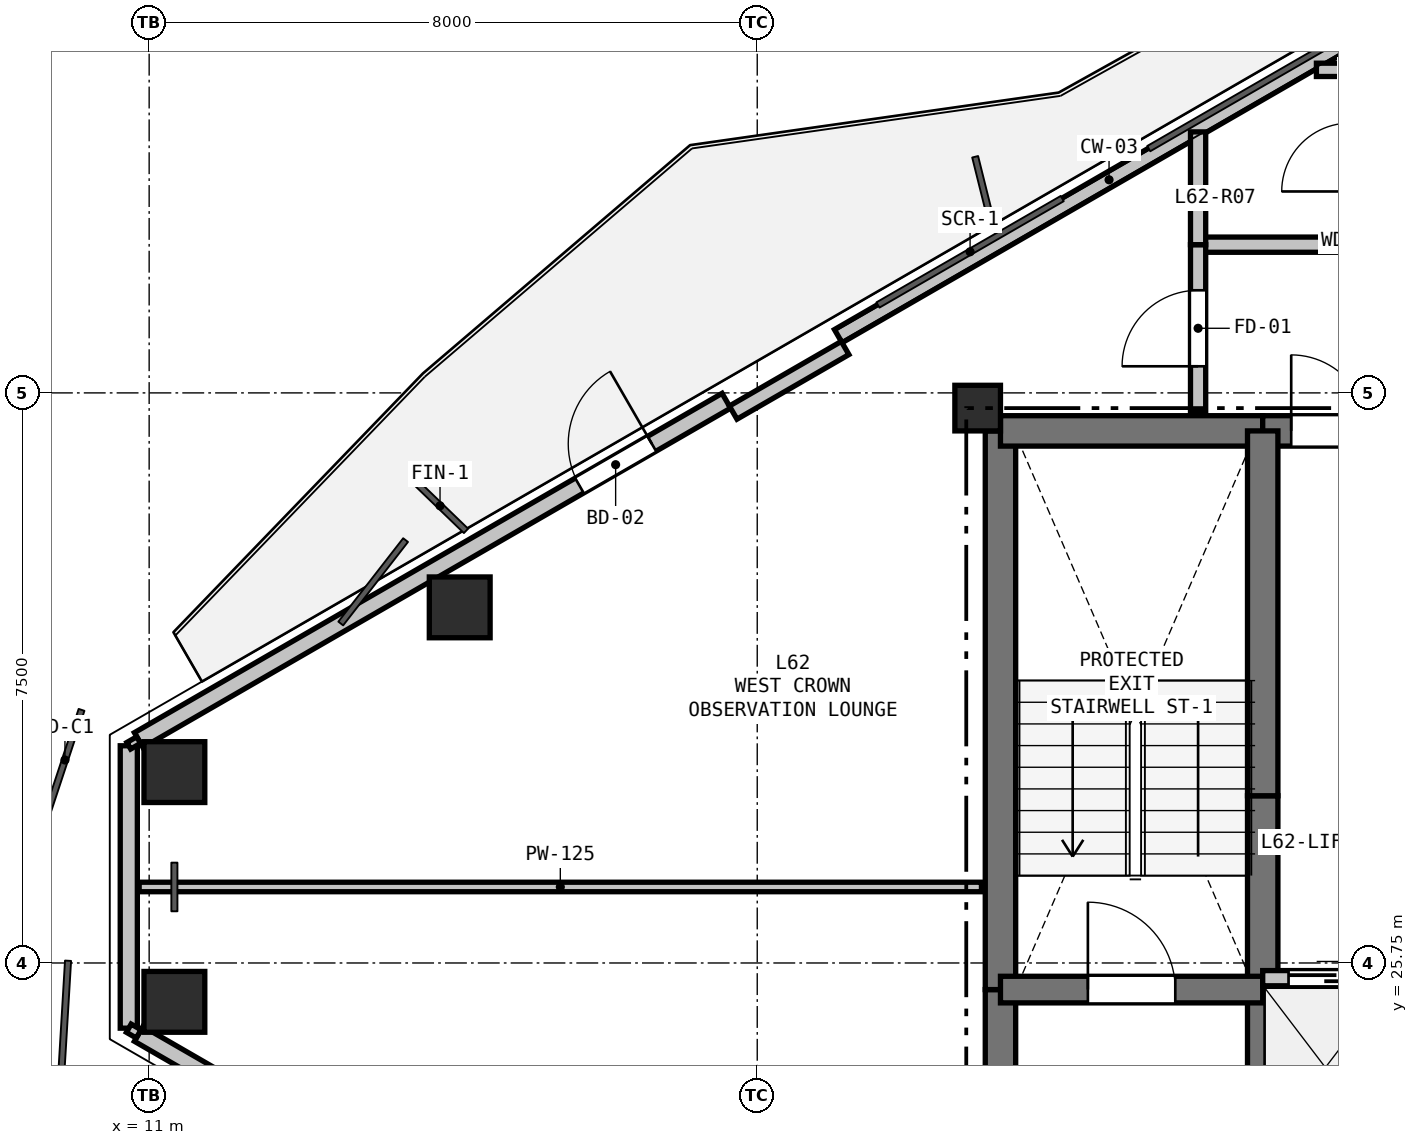
"""IFC4 building model, lengths in metres.
Left out: names, types, materials, properties, quantities, classifications, styles, units other than length and angle.
Written with IfcOpenShell. Run it as: python <this file> out.ifc"""

import sys

from ifc_helpers import new_model, si_unit, direction, frame, frame_2d, origin, origin_2d, place, context, subcontext, project, spatial, rectangle, hollow_rectangle, extrude, element, fill, save


model = new_model("IFC4")
c1 = context("Model", 3, precision=1e-05, world=origin(), true_north=direction((0.0, 1.0)))
c2 = subcontext(c1, "Body", "Model", "MODEL_VIEW")
j1 = project(units=[si_unit("LENGTHUNIT", "METRE"), si_unit("PLANEANGLEUNIT", "RADIAN")], contexts=[c1])
p1 = place(None, origin())
s1 = spatial("IfcSite", under=j1, at=p1, CompositionType="ELEMENT")
p2 = place(p1, origin())
s2 = spatial("IfcBuilding", under=s1, at=p2, CompositionType="ELEMENT")
p3 = place(p2, frame((0.0, 0.0, 223.2)))
s3 = spatial("IfcBuildingStorey", under=s2, at=p3, CompositionType="ELEMENT", Elevation=223.2)
p4 = place(p3, frame((21.9, 33.05, 0.0), z_axis=(0.0, 0.0, 1.0), x_axis=(1.0, 0.0, 0.0)))
e1 = element("IfcColumn", 1, at=p4, inside=s3, PredefinedType="COLUMN", context=c2, shape_type="SweptSolid", body=[
    extrude(rectangle(XDim=0.6, YDim=0.6, at=origin_2d()), origin(), (0.0, 0.0, 1.0), 3.3),
])
for number, where, z_axis, x_axis in (
    (2, (11.332, 28.261, -0.22), (0.0, 0.0, 1.0), (1.0, 0.0, 0.0)),
    (3, (15.086, 30.428, -0.22), (0.0, 0.0, 1.0), (1.0, 0.0, 0.0)),
    (4, (11.332, 25.239, -0.22), (0.0, 0.0, 1.0), (1.0, 0.0, 0.0)),
):
    element("IfcColumn", number, at=place(p3, frame(where, z_axis=z_axis, x_axis=x_axis)), inside=s3, PredefinedType="COLUMN", context=c2, shape_type="SweptSolid", body=[
        extrude(hollow_rectangle(XDim=0.8, YDim=0.8, WallThickness=0.025, at=origin_2d()), origin(), (0.0, 0.0, 1.0), 3.52),
    ])
p5 = place(p3, frame((10.732, 24.892, 0.0), z_axis=(0.0, 0.0, 1.0), x_axis=(0.0, 1.0, 0.0)))
e5 = element("IfcWall", 5, at=p5, inside=s3, PredefinedType="SOLIDWALL", context=c2, shape_type="SweptSolid", body=[
    extrude(rectangle(XDim=3.715, YDim=0.225, at=frame_2d((1.858, 0.0))), origin(), (0.0, 0.0, 1.0), 2.7),
])
p6 = place(p3, frame((10.862, 28.683, 0.0), z_axis=(0.0, 0.0, 1.0), x_axis=(0.866026655105, 0.499997832642, 0.0)))
e6 = element("IfcWall", 6, at=p6, inside=s3, PredefinedType="SOLIDWALL", context=c2, shape_type="SweptSolid", body=[
    extrude(rectangle(XDim=8.928, YDim=0.225, at=frame_2d((4.464, 0.0))), origin(), (0.0, 0.0, 1.0), 2.7),
])
p7 = place(p6, frame((6.696, 0.0, 0.0)))
e7 = element("IfcOpeningElement", 7, at=p7, cuts=e6, PredefinedType="OPENING", context=c2, shape_type="SweptSolid", body=[
    extrude(rectangle(XDim=1.1, YDim=2.1, at=frame_2d((0.55, 1.05))), frame((0.0, 0.123, 0.0), z_axis=(0.0, -1.0, 0.0), x_axis=(1.0, 0.0, 0.0)), (0.0, 0.0, 1.0), 0.245),
])
p8 = place(p3, frame((20.066, 33.997, 0.0), z_axis=(0.0, 0.0, 1.0), x_axis=(0.866019557082, 0.500010126649, 0.0)))
e8 = element("IfcWall", 8, at=p8, inside=s3, PredefinedType="PARAPET", context=c2, shape_type="SweptSolid", body=[
    extrude(rectangle(XDim=8.228, YDim=0.2, at=frame_2d((4.114, 0.0))), origin(), (0.0, 0.0, 1.0), 0.2),
])
p9 = place(p3, frame((18.684, 32.991, 0.0), z_axis=(0.0, 0.0, 1.0), x_axis=(0.866025371046, 0.500000056704, 0.0)))
e9 = element("IfcWall", 9, at=p9, inside=s3, PredefinedType="PARAPET", context=c2, shape_type="SweptSolid", body=[
    extrude(rectangle(XDim=1.7, YDim=0.2, at=frame_2d((0.85, 0.0))), origin(), (0.0, 0.0, 1.0), 2.7),
])
p10 = place(p3, frame((18.594, 20.354, 0.0), z_axis=(0.0, 0.0, 1.0), x_axis=(-0.866026655105, 0.499997832642, 0.0)))
e10 = element("IfcWall", 10, at=p10, inside=s3, PredefinedType="SOLIDWALL", context=c2, shape_type="SweptSolid", body=[
    extrude(rectangle(XDim=8.928, YDim=0.225, at=frame_2d((4.464, 0.0))), origin(), (0.0, 0.0, 1.0), 2.7),
])
p11 = place(p3, frame((22.2, 20.75, 0.0), z_axis=(0.0, 0.0, 1.0), x_axis=(0.0, 1.0, 0.0)))
e11 = element("IfcWall", 11, at=p11, inside=s3, PredefinedType="SHEAR", context=c2, shape_type="SweptSolid", body=[
    extrude(rectangle(XDim=4.65, YDim=0.4, at=frame_2d((2.325, 0.0))), origin(), (0.0, 0.0, 1.0), 3.08),
])
p12 = place(p3, frame((22.2, 25.4, 0.0), z_axis=(0.0, 0.0, 1.0), x_axis=(0.0, 1.0, 0.0)))
e12 = element("IfcWall", 12, at=p12, inside=s3, PredefinedType="SHEAR", context=c2, shape_type="SweptSolid", body=[
    extrude(rectangle(XDim=7.35, YDim=0.4, at=frame_2d((3.675, 0.0))), origin(), (0.0, 0.0, 1.0), 3.08),
])
p13 = place(p3, frame((22.2, 32.75, 0.0), z_axis=(0.0, 0.0, 1.0), x_axis=(1.0, 0.0, 0.0)))
e13 = element("IfcWall", 13, at=p13, inside=s3, PredefinedType="SHEAR", context=c2, shape_type="SweptSolid", body=[
    extrude(rectangle(XDim=3.45, YDim=0.4, at=frame_2d((1.725, 0.0))), origin(), (0.0, 0.0, 1.0), 3.08),
])
p14 = place(p3, frame((25.65, 32.75, 0.0), z_axis=(0.0, 0.0, 1.0), x_axis=(1.0, 0.0, 0.0)))
e14 = element("IfcWall", 14, at=p14, inside=s3, PredefinedType="SHEAR", context=c2, shape_type="SweptSolid", body=[
    extrude(rectangle(XDim=1.75, YDim=0.4, at=frame_2d((0.875, 0.0))), origin(), (0.0, 0.0, 1.0), 3.08),
])
p15 = place(p14, frame((0.375, 0.0, 0.0)))
e15 = element("IfcOpeningElement", 15, at=p15, cuts=e14, PredefinedType="OPENING", context=c2, shape_type="SweptSolid", body=[
    extrude(rectangle(XDim=1.0, YDim=2.15, at=frame_2d((0.5, 1.075))), frame((0.0, 0.21, 0.0), z_axis=(0.0, -1.0, 0.0), x_axis=(1.0, 0.0, 0.0)), (0.0, 0.0, 1.0), 0.42),
])
p16 = place(p3, frame((25.65, 22.75, 0.0), z_axis=(0.0, 0.0, 1.0), x_axis=(0.0, 1.0, 0.0)))
e16 = element("IfcWall", 16, at=p16, inside=s3, PredefinedType="SHEAR", context=c2, shape_type="SweptSolid", body=[
    extrude(rectangle(XDim=2.8, YDim=0.4, at=frame_2d((1.4, 0.0))), origin(), (0.0, 0.0, 1.0), 3.08),
])
p17 = place(p3, frame((25.65, 25.55, 0.0), z_axis=(0.0, 0.0, 1.0), x_axis=(0.0, 1.0, 0.0)))
e17 = element("IfcWall", 17, at=p17, inside=s3, PredefinedType="SHEAR", context=c2, shape_type="SweptSolid", body=[
    extrude(rectangle(XDim=2.4, YDim=0.4, at=frame_2d((1.2, 0.0))), origin(), (0.0, 0.0, 1.0), 3.08),
])
p18 = place(p3, frame((25.65, 27.95, 0.0), z_axis=(0.0, 0.0, 1.0), x_axis=(0.0, 1.0, 0.0)))
e18 = element("IfcWall", 18, at=p18, inside=s3, PredefinedType="SHEAR", context=c2, shape_type="SweptSolid", body=[
    extrude(rectangle(XDim=4.8, YDim=0.4, at=frame_2d((2.4, 0.0))), origin(), (0.0, 0.0, 1.0), 3.08),
])
p19 = place(p3, frame((22.2, 25.4, 0.0), z_axis=(0.0, 0.0, 1.0), x_axis=(1.0, 0.0, 0.0)))
e19 = element("IfcWall", 19, at=p19, inside=s3, PredefinedType="SHEAR", context=c2, shape_type="SweptSolid", body=[
    extrude(rectangle(XDim=3.45, YDim=0.35, at=frame_2d((1.725, 0.0))), origin(), (0.0, 0.0, 1.0), 3.08),
])
p20 = place(p19, frame((1.15, 0.0, 0.0)))
e20 = element("IfcOpeningElement", 20, at=p20, cuts=e19, PredefinedType="OPENING", context=c2, shape_type="SweptSolid", body=[
    extrude(rectangle(XDim=1.15, YDim=2.15, at=frame_2d((0.575, 1.075))), frame((0.0, 0.185, 0.0), z_axis=(0.0, -1.0, 0.0), x_axis=(1.0, 0.0, 0.0)), (0.0, 0.0, 1.0), 0.37),
])
p21 = place(p3, frame((25.65, 25.55, 0.0), z_axis=(0.0, 0.0, 1.0), x_axis=(1.0, 0.0, 0.0)))
e21 = element("IfcWall", 21, at=p21, inside=s3, PredefinedType="PARTITIONING", context=c2, shape_type="SweptSolid", body=[
    extrude(rectangle(XDim=4.95, YDim=0.2, at=frame_2d((2.475, 0.0))), origin(), (0.0, 0.0, 1.0), 3.08),
])
p22 = place(p21, frame((0.34, 0.0, 0.0)))
e22 = element("IfcOpeningElement", 22, at=p22, cuts=e21, PredefinedType="OPENING", context=c2, shape_type="SweptSolid", body=[
    extrude(rectangle(XDim=1.1, YDim=2.15, at=frame_2d((0.55, 1.075))), frame((0.0, 0.11, 0.0), z_axis=(0.0, -1.0, 0.0), x_axis=(1.0, 0.0, 0.0)), (0.0, 0.0, 1.0), 0.22),
])
p23 = place(p21, frame((1.99, 0.0, 0.0)))
e23 = element("IfcOpeningElement", 23, at=p23, cuts=e21, PredefinedType="OPENING", context=c2, shape_type="SweptSolid", body=[
    extrude(rectangle(XDim=1.1, YDim=2.15, at=frame_2d((0.55, 1.075))), frame((0.0, 0.11, 0.0), z_axis=(0.0, -1.0, 0.0), x_axis=(1.0, 0.0, 0.0)), (0.0, 0.0, 1.0), 0.22),
])
p24 = place(p21, frame((3.64, 0.0, 0.0)))
e24 = element("IfcOpeningElement", 24, at=p24, cuts=e21, PredefinedType="OPENING", context=c2, shape_type="SweptSolid", body=[
    extrude(rectangle(XDim=1.1, YDim=2.15, at=frame_2d((0.55, 1.075))), frame((0.0, 0.11, 0.0), z_axis=(0.0, -1.0, 0.0), x_axis=(1.0, 0.0, 0.0)), (0.0, 0.0, 1.0), 0.22),
])
p25 = place(p3, frame((24.8, 35.2, 0.0), z_axis=(0.0, 0.0, 1.0), x_axis=(1.0, 0.0, 0.0)))
e25 = element("IfcWall", 25, at=p25, inside=s3, PredefinedType="PARTITIONING", context=c2, shape_type="SweptSolid", body=[
    extrude(rectangle(XDim=2.0, YDim=0.2, at=frame_2d((1.0, 0.0))), origin(), (0.0, 0.0, 1.0), 3.08),
])
p26 = place(p3, frame((24.8, 33.0, 0.0), z_axis=(0.0, 0.0, 1.0), x_axis=(0.0, 1.0, 0.0)))
e26 = element("IfcWall", 26, at=p26, inside=s3, PredefinedType="PARTITIONING", context=c2, shape_type="SweptSolid", body=[
    extrude(rectangle(XDim=2.2, YDim=0.2, at=frame_2d((1.1, 0.0))), origin(), (0.0, 0.0, 1.0), 2.605),
])
p27 = place(p26, frame((0.6, 0.0, 0.0)))
e27 = element("IfcOpeningElement", 27, at=p27, cuts=e26, PredefinedType="OPENING", context=c2, shape_type="SweptSolid", body=[
    extrude(rectangle(XDim=1.0, YDim=2.15, at=frame_2d((0.5, 1.075))), frame((0.0, 0.11, 0.0), z_axis=(0.0, -1.0, 0.0), x_axis=(1.0, 0.0, 0.0)), (0.0, 0.0, 1.0), 0.22),
])
p28 = place(p3, frame((24.8, 35.2, 0.0), z_axis=(0.0, 0.0, 1.0), x_axis=(0.0, 1.0, 0.0)))
e28 = element("IfcWall", 28, at=p28, inside=s3, PredefinedType="PARTITIONING", context=c2, shape_type="SweptSolid", body=[
    extrude(rectangle(XDim=1.484, YDim=0.2, at=frame_2d((0.742, 0.0))), origin(), (0.0, 0.0, 1.0), 2.365),
])
p29 = place(p3, frame((26.357, 37.5, 0.0), z_axis=(0.0, 0.0, 1.0), x_axis=(1.0, 0.0, 0.0)))
e29 = element("IfcWall", 29, at=p29, inside=s3, PredefinedType="PLUMBINGWALL", context=c2, shape_type="SweptSolid", body=[
    extrude(rectangle(XDim=0.428, YDim=0.175, at=frame_2d((0.214, 0.0))), origin(), (0.0, 0.0, 1.0), 3.08),
])
p30 = place(p3, frame((21.95, 26.75, 0.0), z_axis=(0.0, 0.0, 1.0), x_axis=(-1.0, 0.0, 0.0)))
e30 = element("IfcWall", 30, at=p30, inside=s3, PredefinedType="PARTITIONING", context=c2, shape_type="SweptSolid", body=[
    extrude(rectangle(XDim=11.082, YDim=0.125, at=frame_2d((5.541, 0.0))), origin(), (0.0, 0.0, 1.0), 2.605),
])
p31 = place(p3, frame((10.732, 28.608, 0.0), z_axis=(0.0, 0.0, 1.0), x_axis=(0.866131372301, 0.499816412211, 0.0)))
e31 = element("IfcWall", 31, at=p31, inside=s3, PredefinedType="PARTITIONING", context=c2, shape_type="SweptSolid", body=[
    extrude(rectangle(XDim=0.15, YDim=0.1, at=frame_2d((0.075, 0.0))), origin(), (0.0, 0.0, 1.0), 3.08),
])
p32 = place(p3, frame((10.862, 24.817, 0.0), z_axis=(0.0, 0.0, 1.0), x_axis=(-0.866131372301, 0.499816412211, 0.0)))
e32 = element("IfcWall", 32, at=p32, inside=s3, PredefinedType="PARTITIONING", context=c2, shape_type="SweptSolid", body=[
    extrude(rectangle(XDim=0.15, YDim=0.125, at=frame_2d((0.075, 0.0))), origin(), (0.0, 0.0, 1.0), 3.08),
])
p33 = place(p7, origin())
e33 = element("IfcDoor", 33, at=p33, inside=s3, OperationType="SINGLE_SWING_RIGHT", PredefinedType="DOOR", context=c2, shape_type="SweptSolid", body=[
    extrude(rectangle(XDim=1.1, YDim=2.1, at=frame_2d((0.55, 1.05))), frame((0.0, 0.025, 0.0), z_axis=(0.0, -1.0, 0.0), x_axis=(1.0, 0.0, 0.0)), (0.0, 0.0, 1.0), 0.05),
])
fill(e7, e33)
p34 = place(p22, origin())
e34 = element("IfcDoor", 34, at=p34, inside=s3, OperationType="SLIDING_TO_LEFT", PredefinedType="DOOR", context=c2, shape_type="SweptSolid", body=[
    extrude(rectangle(XDim=1.1, YDim=2.15, at=frame_2d((0.55, 1.075))), frame((0.0, 0.025, 0.0), z_axis=(0.0, -1.0, 0.0), x_axis=(1.0, 0.0, 0.0)), (0.0, 0.0, 1.0), 0.05),
])
fill(e22, e34)
p35 = place(p15, origin())
e35 = element("IfcDoor", 35, at=p35, inside=s3, OperationType="SINGLE_SWING_LEFT", PredefinedType="DOOR", context=c2, shape_type="SweptSolid", body=[
    extrude(rectangle(XDim=1.0, YDim=2.15, at=frame_2d((0.5, 1.075))), frame((0.0, 0.025, 0.0), z_axis=(0.0, -1.0, 0.0), x_axis=(1.0, 0.0, 0.0)), (0.0, 0.0, 1.0), 0.05),
])
fill(e15, e35)
p36 = place(p20, origin())
e36 = element("IfcDoor", 36, at=p36, inside=s3, OperationType="SINGLE_SWING_LEFT", PredefinedType="DOOR", context=c2, shape_type="SweptSolid", body=[
    extrude(rectangle(XDim=1.15, YDim=2.15, at=frame_2d((0.575, 1.075))), frame((0.0, 0.025, 0.0), z_axis=(0.0, -1.0, 0.0), x_axis=(1.0, 0.0, 0.0)), (0.0, 0.0, 1.0), 0.05),
])
fill(e20, e36)
p37 = place(p27, origin())
e37 = element("IfcDoor", 37, at=p37, inside=s3, OperationType="SINGLE_SWING_LEFT", PredefinedType="DOOR", context=c2, shape_type="SweptSolid", body=[
    extrude(rectangle(XDim=1.0, YDim=2.15, at=frame_2d((0.5, 1.075))), frame((0.0, 0.025, 0.0), z_axis=(0.0, -1.0, 0.0), x_axis=(1.0, 0.0, 0.0)), (0.0, 0.0, 1.0), 0.05),
])
fill(e27, e37)
save(model, sys.argv[1])
